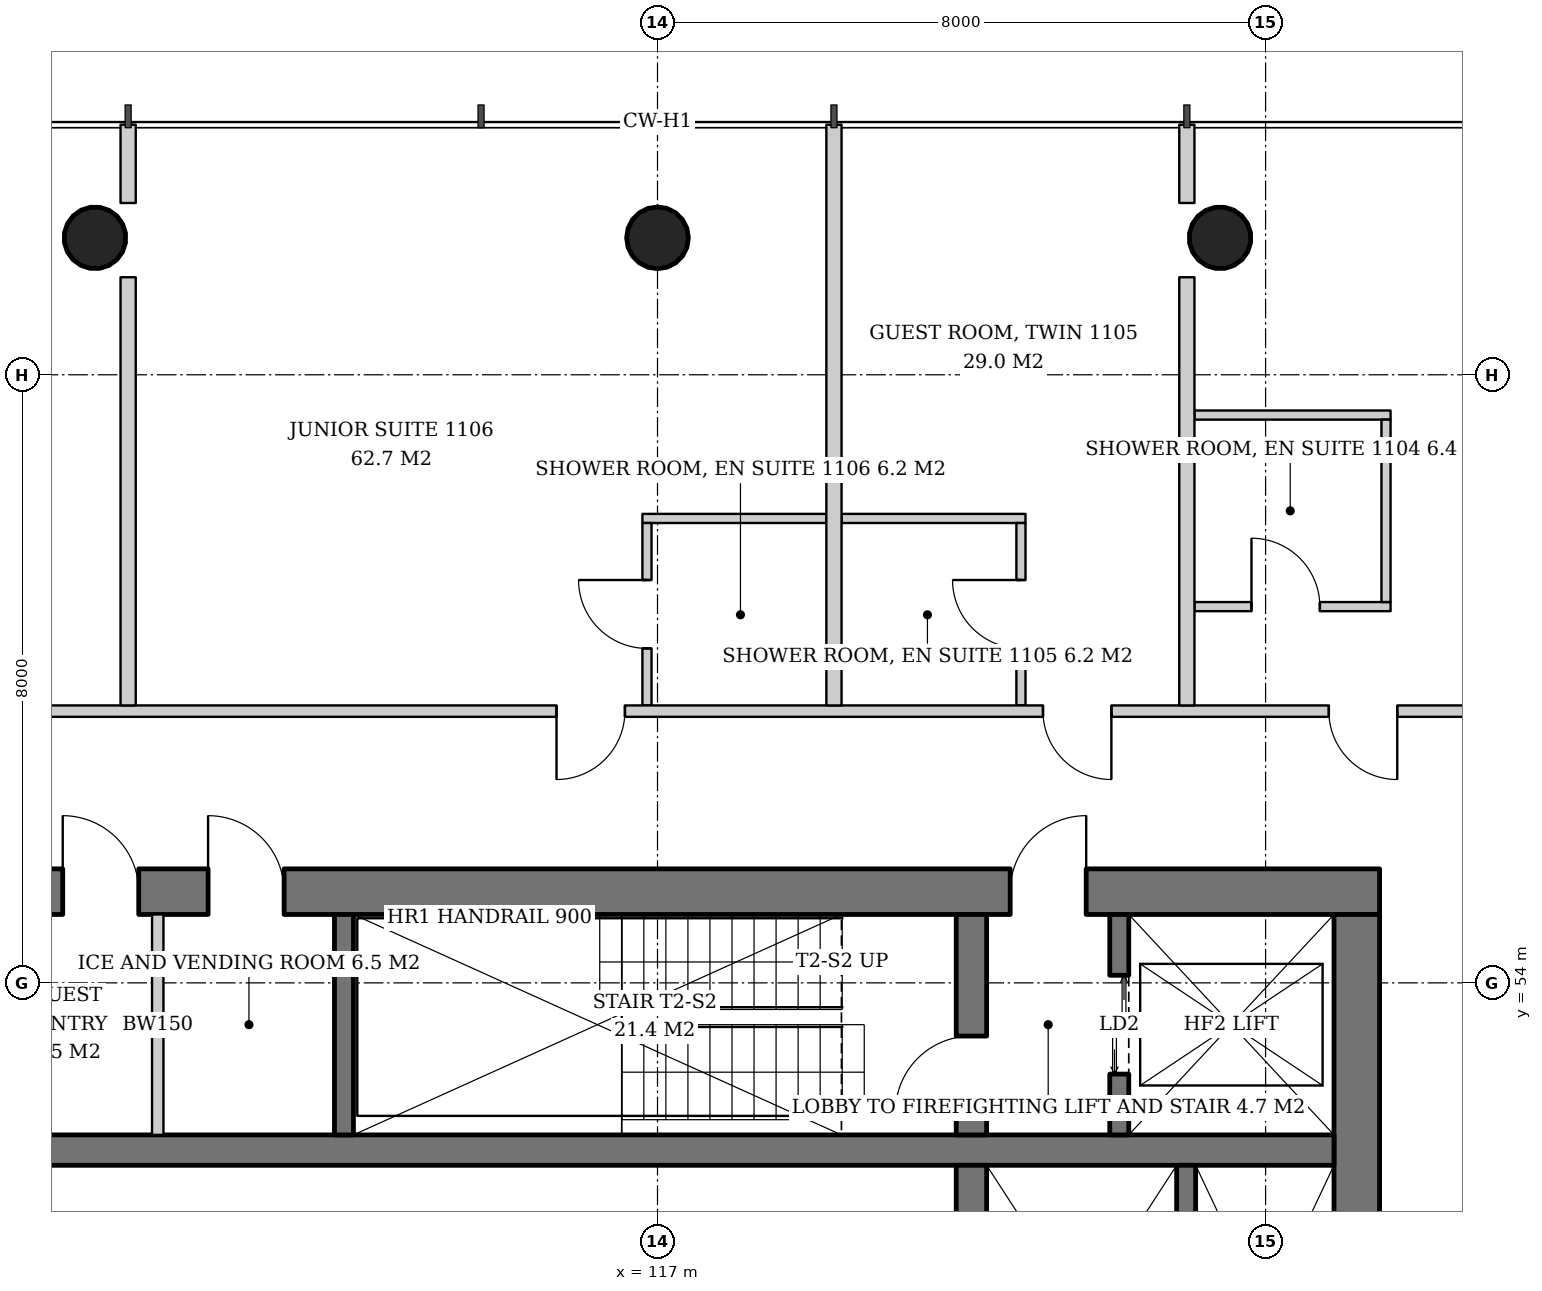
"""IFC4 building model, lengths in metres.
Left out: names, types, materials, properties, quantities, classifications, styles, units other than length and angle.
Written with IfcOpenShell. Run it as: python <this file> out.ifc"""

import sys

from ifc_helpers import new_model, si_unit, direction, frame, frame_2d, origin, origin_2d, place, context, subcontext, project, spatial, rectangle, hollow_circle, extrude, element, fill, save


model = new_model("IFC4")
c1 = context("Model", 3, precision=1e-05, world=origin(), true_north=direction((0.0, 1.0)))
c2 = subcontext(c1, "Body", "Model", "MODEL_VIEW")
j1 = project(units=[si_unit("LENGTHUNIT", "METRE"), si_unit("PLANEANGLEUNIT", "RADIAN")], contexts=[c1])
p1 = place(None, origin())
s1 = spatial("IfcSite", under=j1, at=p1, CompositionType="ELEMENT")
p2 = place(p1, origin())
s2 = spatial("IfcBuilding", under=s1, at=p2, CompositionType="ELEMENT")
p3 = place(p2, frame((0.0, 0.0, 47.6)))
s3 = spatial("IfcBuildingStorey", under=s2, at=p3, CompositionType="ELEMENT", Elevation=47.6)
p4 = place(p3, frame((124.427, 63.854, 0.0), z_axis=(-0.021563230905, -0.043062285527, 0.998839660125), x_axis=(0.894160516368, -0.44774654769, 0.0)))
e1 = element("IfcColumn", 1, at=p4, inside=s3, PredefinedType="COLUMN", context=c2, shape_type="SweptSolid", body=[
    extrude(hollow_circle(Radius=0.406, WallThickness=0.03, at=origin_2d()), origin(), (0.0, 0.0, 1.0), 3.804),
])
p5 = place(p3, frame((117.0, 63.854, 0.0), z_axis=(0.0, -0.043072300418, 0.999071957837), x_axis=(1.0, 0.0, 0.0)))
e2 = element("IfcColumn", 2, at=p5, inside=s3, PredefinedType="COLUMN", context=c2, shape_type="SweptSolid", body=[
    extrude(hollow_circle(Radius=0.406, WallThickness=0.03, at=origin_2d()), origin(), (0.0, 0.0, 1.0), 3.803),
])
p6 = place(p3, frame((109.573, 63.854, 0.0), z_axis=(0.021563230905, -0.043062285527, 0.998839660125), x_axis=(0.894160516368, 0.44774654769, 0.0)))
e3 = element("IfcColumn", 3, at=p6, inside=s3, PredefinedType="COLUMN", context=c2, shape_type="SweptSolid", body=[
    extrude(hollow_circle(Radius=0.406, WallThickness=0.03, at=origin_2d()), origin(), (0.0, 0.0, 1.0), 3.804),
])
p7 = place(p3, frame((107.5, 55.2, 0.0), z_axis=(0.0, 0.0, 1.0), x_axis=(1.0, 0.0, 0.0)))
e4 = element("IfcWall", 4, at=p7, inside=s3, PredefinedType="SHEAR", context=c2, shape_type="SweptSolid", body=[
    extrude(rectangle(XDim=19.0, YDim=0.6, at=frame_2d((9.5, 0.0))), origin(), (0.0, 0.0, 1.0), 3.8),
])
p8 = place(p7, frame((14.14, 0.0, 0.0)))
e5 = element("IfcOpeningElement", 5, at=p8, cuts=e4, PredefinedType="OPENING", context=c2, shape_type="SweptSolid", body=[
    extrude(rectangle(XDim=1.0, YDim=2.1, at=frame_2d((0.5, 1.05))), frame((0.0, 0.31, 0.0), z_axis=(0.0, -1.0, 0.0), x_axis=(1.0, 0.0, 0.0)), (0.0, 0.0, 1.0), 0.62),
])
p9 = place(p7, frame((1.675, 0.0, 0.0)))
e6 = element("IfcOpeningElement", 6, at=p9, cuts=e4, PredefinedType="OPENING", context=c2, shape_type="SweptSolid", body=[
    extrude(rectangle(XDim=1.0, YDim=2.1, at=frame_2d((0.5, 1.05))), frame((0.0, 0.31, 0.0), z_axis=(0.0, -1.0, 0.0), x_axis=(1.0, 0.0, 0.0)), (0.0, 0.0, 1.0), 0.62),
])
p10 = place(p7, frame((3.587, 0.0, 0.0)))
e7 = element("IfcOpeningElement", 7, at=p10, cuts=e4, PredefinedType="OPENING", context=c2, shape_type="SweptSolid", body=[
    extrude(rectangle(XDim=1.0, YDim=2.1, at=frame_2d((0.5, 1.05))), frame((0.0, 0.31, 0.0), z_axis=(0.0, -1.0, 0.0), x_axis=(1.0, 0.0, 0.0)), (0.0, 0.0, 1.0), 0.62),
])
p11 = place(p3, frame((126.2, 37.1, 0.0), z_axis=(0.0, 0.0, 1.0), x_axis=(0.0, 1.0, 0.0)))
e8 = element("IfcWall", 8, at=p11, inside=s3, PredefinedType="SHEAR", context=c2, shape_type="SweptSolid", body=[
    extrude(rectangle(XDim=17.8, YDim=0.6, at=frame_2d((8.9, 0.0))), origin(), (0.0, 0.0, 1.0), 3.8),
])
p12 = place(p11, frame((8.0, 0.0, 0.0)))
e9 = element("IfcOpeningElement", 9, at=p12, cuts=e8, PredefinedType="OPENING", context=c2, shape_type="SweptSolid", body=[
    extrude(rectangle(XDim=1.8, YDim=2.4, at=frame_2d((0.9, 1.2))), frame((0.0, 0.31, 0.0), z_axis=(0.0, -1.0, 0.0), x_axis=(1.0, 0.0, 0.0)), (0.0, 0.0, 1.0), 0.62),
])
p13 = place(p3, frame((108.1, 51.8, 0.0), z_axis=(0.0, 0.0, 1.0), x_axis=(1.0, 0.0, 0.0)))
e10 = element("IfcWall", 10, at=p13, inside=s3, PredefinedType="SHEAR", context=c2, shape_type="SweptSolid", body=[
    extrude(rectangle(XDim=17.8, YDim=0.4, at=frame_2d((8.9, 0.0))), origin(), (0.0, 0.0, 1.0), 3.8),
])
p14 = place(p3, frame((121.13, 40.4, 0.0), z_axis=(0.0, 0.0, 1.0), x_axis=(0.0, 1.0, 0.0)))
e11 = element("IfcWall", 11, at=p14, inside=s3, PredefinedType="SHEAR", context=c2, shape_type="SweptSolid", body=[
    extrude(rectangle(XDim=11.2, YDim=0.4, at=frame_2d((5.6, 0.0))), origin(), (0.0, 0.0, 1.0), 3.8),
])
p15 = place(p3, frame((121.13, 52.0, 0.0), z_axis=(0.0, 0.0, 1.0), x_axis=(0.0, 1.0, 0.0)))
e12 = element("IfcWall", 12, at=p15, inside=s3, PredefinedType="SHEAR", context=c2, shape_type="SweptSolid", body=[
    extrude(rectangle(XDim=2.9, YDim=0.4, at=frame_2d((1.45, 0.0))), origin(), (0.0, 0.0, 1.0), 3.8),
])
p16 = place(p15, frame((0.3, 0.0, 0.0)))
e13 = element("IfcOpeningElement", 13, at=p16, cuts=e12, PredefinedType="OPENING", context=c2, shape_type="SweptSolid", body=[
    extrude(rectangle(XDim=1.0, YDim=2.1, at=frame_2d((0.5, 1.05))), frame((0.0, 0.21, 0.0), z_axis=(0.0, -1.0, 0.0), x_axis=(1.0, 0.0, 0.0)), (0.0, 0.0, 1.0), 0.42),
])
p17 = place(p3, frame((112.875, 52.0, 0.0), z_axis=(0.0, 0.0, 1.0), x_axis=(0.0, 1.0, 0.0)))
e14 = element("IfcWall", 14, at=p17, inside=s3, PredefinedType="SHEAR", context=c2, shape_type="SweptSolid", body=[
    extrude(rectangle(XDim=2.9, YDim=0.25, at=frame_2d((1.45, 0.0))), origin(), (0.0, 0.0, 1.0), 3.8),
])
p18 = place(p3, frame((123.075, 52.0, 0.0), z_axis=(0.0, 0.0, 1.0), x_axis=(0.0, 1.0, 0.0)))
e15 = element("IfcWall", 15, at=p18, inside=s3, PredefinedType="SHEAR", context=c2, shape_type="SweptSolid", body=[
    extrude(rectangle(XDim=2.9, YDim=0.25, at=frame_2d((1.45, 0.0))), origin(), (0.0, 0.0, 1.0), 3.8),
])
p19 = place(p18, frame((0.8, 0.0, 0.0)))
e16 = element("IfcOpeningElement", 16, at=p19, cuts=e15, PredefinedType="OPENING", context=c2, shape_type="SweptSolid", body=[
    extrude(rectangle(XDim=1.3, YDim=2.2, at=frame_2d((0.65, 1.1))), frame((0.0, 0.135, 0.0), z_axis=(0.0, -1.0, 0.0), x_axis=(1.0, 0.0, 0.0)), (0.0, 0.0, 1.0), 0.27),
])
p20 = place(p3, frame((123.955, 47.75, 0.0), z_axis=(0.0, 0.0, 1.0), x_axis=(0.0, 1.0, 0.0)))
e17 = element("IfcWall", 17, at=p20, inside=s3, PredefinedType="SHEAR", context=c2, shape_type="SweptSolid", body=[
    extrude(rectangle(XDim=3.85, YDim=0.25, at=frame_2d((1.925, 0.0))), origin(), (0.0, 0.0, 1.0), 3.8),
])
p21 = place(p3, frame((110.425, 52.0, 0.0), z_axis=(0.0, 0.0, 1.0), x_axis=(0.0, 1.0, 0.0)))
e18 = element("IfcWall", 18, at=p21, inside=s3, PredefinedType="SOLIDWALL", context=c2, shape_type="SweptSolid", body=[
    extrude(rectangle(XDim=2.9, YDim=0.15, at=frame_2d((1.45, 0.0))), origin(), (0.0, 0.0, 1.0), 3.6),
])
p22 = place(p3, frame((124.064, 58.95, 0.0), z_axis=(0.0, 0.0, 1.0), x_axis=(1.0, 0.0, 0.0)))
e19 = element("IfcWall", 19, at=p22, inside=s3, PredefinedType="PARTITIONING", context=c2, shape_type="SweptSolid", body=[
    extrude(rectangle(XDim=2.58, YDim=0.12, at=frame_2d((1.29, 0.0))), origin(), (0.0, 0.0, 1.0), 2.8),
])
p23 = place(p22, frame((0.75, 0.0, 0.0)))
e20 = element("IfcOpeningElement", 20, at=p23, cuts=e19, PredefinedType="OPENING", context=c2, shape_type="SweptSolid", body=[
    extrude(rectangle(XDim=0.9, YDim=2.1, at=frame_2d((0.45, 1.05))), frame((0.0, 0.07, 0.0), z_axis=(0.0, -1.0, 0.0), x_axis=(1.0, 0.0, 0.0)), (0.0, 0.0, 1.0), 0.14),
])
p24 = place(p3, frame((124.064, 61.47, 0.0), z_axis=(0.0, 0.0, 1.0), x_axis=(1.0, 0.0, 0.0)))
e21 = element("IfcWall", 21, at=p24, inside=s3, PredefinedType="PARTITIONING", context=c2, shape_type="SweptSolid", body=[
    extrude(rectangle(XDim=2.58, YDim=0.12, at=frame_2d((1.29, 0.0))), origin(), (0.0, 0.0, 1.0), 2.8),
])
p25 = place(p3, frame((126.584, 59.01, 0.0), z_axis=(0.0, 0.0, 1.0), x_axis=(0.0, 1.0, 0.0)))
e22 = element("IfcWall", 22, at=p25, inside=s3, PredefinedType="PARTITIONING", context=c2, shape_type="SweptSolid", body=[
    extrude(rectangle(XDim=2.4, YDim=0.12, at=frame_2d((1.2, 0.0))), origin(), (0.0, 0.0, 1.0), 2.847),
])
p26 = place(p3, frame((121.841, 60.11, 0.0), z_axis=(0.0, 0.0, 1.0), x_axis=(-1.0, 0.0, 0.0)))
e23 = element("IfcWall", 23, at=p26, inside=s3, PredefinedType="PARTITIONING", context=c2, shape_type="SweptSolid", body=[
    extrude(rectangle(XDim=2.42, YDim=0.12, at=frame_2d((1.21, 0.0))), origin(), (0.0, 0.0, 1.0), 2.847),
])
p27 = place(p3, frame((121.781, 57.65, 0.0), z_axis=(0.0, 0.0, 1.0), x_axis=(0.0, 1.0, 0.0)))
e24 = element("IfcWall", 24, at=p27, inside=s3, PredefinedType="PARTITIONING", context=c2, shape_type="SweptSolid", body=[
    extrude(rectangle(XDim=2.4, YDim=0.12, at=frame_2d((1.2, 0.0))), origin(), (0.0, 0.0, 1.0), 2.847),
])
p28 = place(p27, frame((0.75, 0.0, 0.0)))
e25 = element("IfcOpeningElement", 25, at=p28, cuts=e24, PredefinedType="OPENING", context=c2, shape_type="SweptSolid", body=[
    extrude(rectangle(XDim=0.9, YDim=2.1, at=frame_2d((0.45, 1.05))), frame((0.0, 0.07, 0.0), z_axis=(0.0, -1.0, 0.0), x_axis=(1.0, 0.0, 0.0)), (0.0, 0.0, 1.0), 0.14),
])
p29 = place(p3, frame((119.221, 60.11, 0.0), z_axis=(0.0, 0.0, 1.0), x_axis=(-1.0, 0.0, 0.0)))
e26 = element("IfcWall", 26, at=p29, inside=s3, PredefinedType="PARTITIONING", context=c2, shape_type="SweptSolid", body=[
    extrude(rectangle(XDim=2.42, YDim=0.12, at=frame_2d((1.21, 0.0))), origin(), (0.0, 0.0, 1.0), 2.847),
])
p30 = place(p3, frame((116.861, 57.65, 0.0), z_axis=(0.0, 0.0, 1.0), x_axis=(0.0, 1.0, 0.0)))
e27 = element("IfcWall", 27, at=p30, inside=s3, PredefinedType="PARTITIONING", context=c2, shape_type="SweptSolid", body=[
    extrude(rectangle(XDim=2.4, YDim=0.12, at=frame_2d((1.2, 0.0))), origin(), (0.0, 0.0, 1.0), 3.6),
])
p31 = place(p30, frame((0.75, 0.0, 0.0)))
e28 = element("IfcOpeningElement", 28, at=p31, cuts=e27, PredefinedType="OPENING", context=c2, shape_type="SweptSolid", body=[
    extrude(rectangle(XDim=0.9, YDim=2.1, at=frame_2d((0.45, 1.05))), frame((0.0, 0.07, 0.0), z_axis=(0.0, -1.0, 0.0), x_axis=(1.0, 0.0, 0.0)), (0.0, 0.0, 1.0), 0.14),
])
p32 = place(p3, frame((128.65, 57.575, 0.0), z_axis=(0.0, 0.0, 1.0), x_axis=(-1.0, 0.0, 0.0)))
e29 = element("IfcWall", 29, at=p32, inside=s3, PredefinedType="PARTITIONING", context=c2, shape_type="SweptSolid", body=[
    extrude(rectangle(XDim=23.15, YDim=0.15, at=frame_2d((11.575, 0.0))), origin(), (0.0, 0.0, 1.0), 2.8),
])
p33 = place(p32, frame((1.918, 0.0, 0.0)))
e30 = element("IfcOpeningElement", 30, at=p33, cuts=e29, PredefinedType="OPENING", context=c2, shape_type="SweptSolid", body=[
    extrude(rectangle(XDim=0.9, YDim=2.1, at=frame_2d((0.45, 1.05))), frame((0.0, 0.085, 0.0), z_axis=(0.0, -1.0, 0.0), x_axis=(1.0, 0.0, 0.0)), (0.0, 0.0, 1.0), 0.17),
])
p34 = place(p32, frame((5.678, 0.0, 0.0)))
e31 = element("IfcOpeningElement", 31, at=p34, cuts=e29, PredefinedType="OPENING", context=c2, shape_type="SweptSolid", body=[
    extrude(rectangle(XDim=0.9, YDim=2.1, at=frame_2d((0.45, 1.05))), frame((0.0, 0.085, 0.0), z_axis=(0.0, -1.0, 0.0), x_axis=(1.0, 0.0, 0.0)), (0.0, 0.0, 1.0), 0.17),
])
p35 = place(p32, frame((12.079, 0.0, 0.0)))
e32 = element("IfcOpeningElement", 32, at=p35, cuts=e29, PredefinedType="OPENING", context=c2, shape_type="SweptSolid", body=[
    extrude(rectangle(XDim=0.9, YDim=2.1, at=frame_2d((0.45, 1.05))), frame((0.0, 0.085, 0.0), z_axis=(0.0, -1.0, 0.0), x_axis=(1.0, 0.0, 0.0)), (0.0, 0.0, 1.0), 0.17),
])
p36 = place(p3, frame((123.964, 57.65, 0.0), z_axis=(0.0, 0.0, 1.0), x_axis=(0.0, 1.0, 0.0)))
e33 = element("IfcWall", 33, at=p36, inside=s3, PredefinedType="PARTITIONING", context=c2, shape_type="SweptSolid", body=[
    extrude(rectangle(XDim=5.633, YDim=0.2, at=frame_2d((2.817, 0.0))), origin(), (0.0, 0.0, 1.0), 3.6),
])
p37 = place(p3, frame((123.964, 64.26, 0.0), z_axis=(0.0, 0.0, 1.0), x_axis=(0.0, 1.0, 0.0)))
e34 = element("IfcWall", 34, at=p37, inside=s3, PredefinedType="PARTITIONING", context=c2, shape_type="SweptSolid", body=[
    extrude(rectangle(XDim=1.03, YDim=0.2, at=frame_2d((0.515, 0.0))), origin(), (0.0, 0.0, 1.0), 3.6),
])
p38 = place(p3, frame((119.322, 57.65, 0.0), z_axis=(0.0, 0.0, 1.0), x_axis=(0.0, 1.0, 0.0)))
e35 = element("IfcWall", 35, at=p38, inside=s3, PredefinedType="PARTITIONING", context=c2, shape_type="SweptSolid", body=[
    extrude(rectangle(XDim=7.64, YDim=0.2, at=frame_2d((3.82, 0.0))), origin(), (0.0, 0.0, 1.0), 3.05),
])
p39 = place(p3, frame((110.036, 57.65, 0.0), z_axis=(0.0, 0.0, 1.0), x_axis=(0.0, 1.0, 0.0)))
e36 = element("IfcWall", 36, at=p39, inside=s3, PredefinedType="PARTITIONING", context=c2, shape_type="SweptSolid", body=[
    extrude(rectangle(XDim=5.633, YDim=0.2, at=frame_2d((2.817, 0.0))), origin(), (0.0, 0.0, 1.0), 3.6),
])
p40 = place(p3, frame((110.036, 64.26, 0.0), z_axis=(0.0, 0.0, 1.0), x_axis=(0.0, 1.0, 0.0)))
e37 = element("IfcWall", 37, at=p40, inside=s3, PredefinedType="PARTITIONING", context=c2, shape_type="SweptSolid", body=[
    extrude(rectangle(XDim=1.03, YDim=0.2, at=frame_2d((0.515, 0.0))), origin(), (0.0, 0.0, 1.0), 3.6),
])
p41 = place(p19, origin())
e38 = element("IfcDoor", 38, at=p41, inside=s3, OperationType="DOUBLE_DOOR_SLIDING", PredefinedType="DOOR", context=c2, shape_type="SweptSolid", body=[
    extrude(rectangle(XDim=1.3, YDim=2.2, at=frame_2d((0.65, 1.1))), frame((0.0, 0.025, 0.0), z_axis=(0.0, -1.0, 0.0), x_axis=(1.0, 0.0, 0.0)), (0.0, 0.0, 1.0), 0.05),
])
fill(e16, e38)
p42 = place(p16, origin())
e39 = element("IfcDoor", 39, at=p42, inside=s3, OperationType="SINGLE_SWING_LEFT", PredefinedType="DOOR", context=c2, shape_type="SweptSolid", body=[
    extrude(rectangle(XDim=1.0, YDim=2.1, at=frame_2d((0.5, 1.05))), frame((0.0, 0.025, 0.0), z_axis=(0.0, -1.0, 0.0), x_axis=(1.0, 0.0, 0.0)), (0.0, 0.0, 1.0), 0.05),
])
fill(e13, e39)
p43 = place(p8, origin())
e40 = element("IfcDoor", 40, at=p43, inside=s3, OperationType="SINGLE_SWING_RIGHT", PredefinedType="DOOR", context=c2, shape_type="SweptSolid", body=[
    extrude(rectangle(XDim=1.0, YDim=2.1, at=frame_2d((0.5, 1.05))), frame((0.0, 0.025, 0.0), z_axis=(0.0, -1.0, 0.0), x_axis=(1.0, 0.0, 0.0)), (0.0, 0.0, 1.0), 0.05),
])
fill(e5, e40)
p44 = place(p9, origin())
e41 = element("IfcDoor", 41, at=p44, inside=s3, OperationType="SINGLE_SWING_LEFT", PredefinedType="DOOR", context=c2, shape_type="SweptSolid", body=[
    extrude(rectangle(XDim=1.0, YDim=2.1, at=frame_2d((0.5, 1.05))), frame((0.0, -0.24, 0.0), z_axis=(0.0, -1.0, 0.0), x_axis=(1.0, 0.0, 0.0)), (0.0, 0.0, 1.0), 0.05),
])
fill(e6, e41)
p45 = place(p10, origin())
e42 = element("IfcDoor", 42, at=p45, inside=s3, OperationType="SINGLE_SWING_LEFT", PredefinedType="DOOR", context=c2, shape_type="SweptSolid", body=[
    extrude(rectangle(XDim=1.0, YDim=2.1, at=frame_2d((0.5, 1.05))), frame((0.0, -0.24, 0.0), z_axis=(0.0, -1.0, 0.0), x_axis=(1.0, 0.0, 0.0)), (0.0, 0.0, 1.0), 0.05),
])
fill(e7, e42)
p46 = place(p23, origin())
e43 = element("IfcDoor", 43, at=p46, inside=s3, OperationType="SINGLE_SWING_LEFT", PredefinedType="DOOR", context=c2, shape_type="SweptSolid", body=[
    extrude(rectangle(XDim=0.9, YDim=2.1, at=frame_2d((0.45, 1.05))), frame((0.0, 0.025, 0.0), z_axis=(0.0, -1.0, 0.0), x_axis=(1.0, 0.0, 0.0)), (0.0, 0.0, 1.0), 0.05),
])
fill(e20, e43)
p47 = place(p28, origin())
e44 = element("IfcDoor", 44, at=p47, inside=s3, OperationType="SINGLE_SWING_RIGHT", PredefinedType="DOOR", context=c2, shape_type="SweptSolid", body=[
    extrude(rectangle(XDim=0.9, YDim=2.1, at=frame_2d((0.45, 1.05))), frame((0.0, 0.025, 0.0), z_axis=(0.0, -1.0, 0.0), x_axis=(1.0, 0.0, 0.0)), (0.0, 0.0, 1.0), 0.05),
])
fill(e25, e44)
p48 = place(p31, origin())
e45 = element("IfcDoor", 45, at=p48, inside=s3, OperationType="SINGLE_SWING_RIGHT", PredefinedType="DOOR", context=c2, shape_type="SweptSolid", body=[
    extrude(rectangle(XDim=0.9, YDim=2.1, at=frame_2d((0.45, 1.05))), frame((0.0, 0.025, 0.0), z_axis=(0.0, -1.0, 0.0), x_axis=(1.0, 0.0, 0.0)), (0.0, 0.0, 1.0), 0.05),
])
fill(e28, e45)
p49 = place(p33, origin())
e46 = element("IfcDoor", 46, at=p49, inside=s3, OperationType="SINGLE_SWING_LEFT", PredefinedType="DOOR", context=c2, shape_type="SweptSolid", body=[
    extrude(rectangle(XDim=0.9, YDim=2.1, at=frame_2d((0.45, 1.05))), frame((0.0, 0.025, 0.0), z_axis=(0.0, -1.0, 0.0), x_axis=(1.0, 0.0, 0.0)), (0.0, 0.0, 1.0), 0.05),
])
fill(e30, e46)
p50 = place(p34, origin())
e47 = element("IfcDoor", 47, at=p50, inside=s3, OperationType="SINGLE_SWING_LEFT", PredefinedType="DOOR", context=c2, shape_type="SweptSolid", body=[
    extrude(rectangle(XDim=0.9, YDim=2.1, at=frame_2d((0.45, 1.05))), frame((0.0, 0.025, 0.0), z_axis=(0.0, -1.0, 0.0), x_axis=(1.0, 0.0, 0.0)), (0.0, 0.0, 1.0), 0.05),
])
fill(e31, e47)
p51 = place(p35, origin())
e48 = element("IfcDoor", 48, at=p51, inside=s3, OperationType="SINGLE_SWING_RIGHT", PredefinedType="DOOR", context=c2, shape_type="SweptSolid", body=[
    extrude(rectangle(XDim=0.9, YDim=2.1, at=frame_2d((0.45, 1.05))), frame((0.0, 0.025, 0.0), z_axis=(0.0, -1.0, 0.0), x_axis=(1.0, 0.0, 0.0)), (0.0, 0.0, 1.0), 0.05),
])
fill(e32, e48)
save(model, sys.argv[1])
